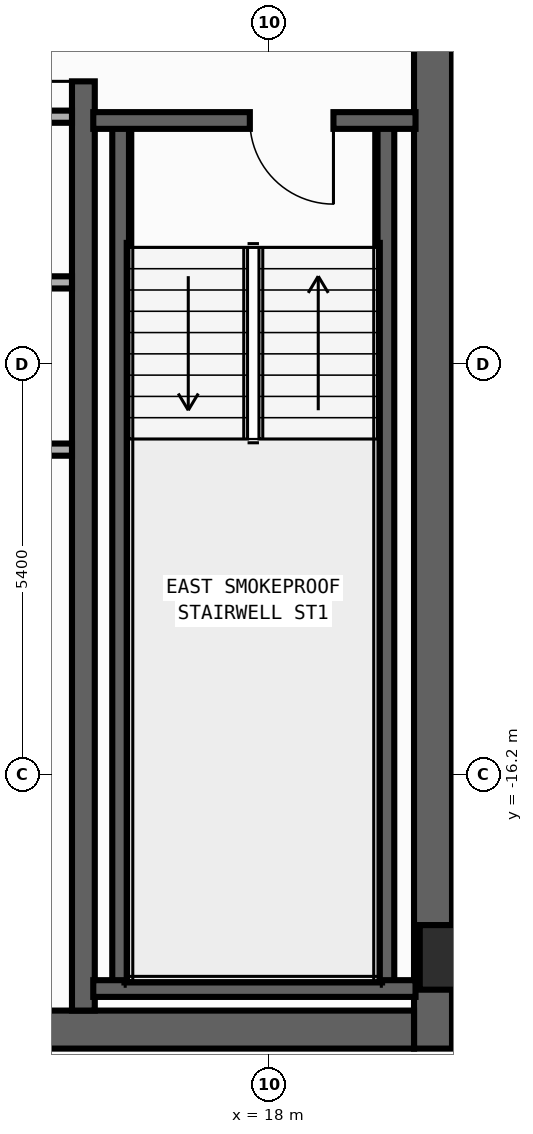
"""IFC4 building model, lengths in metres.
Left out: names, types, materials, properties, quantities, classifications, styles, units other than length and angle.
Written with IfcOpenShell. Run it as: python <this file> out.ifc"""

import sys

from ifc_helpers import new_model, si_unit, direction, frame, frame_2d, origin, origin_2d, place, context, subcontext, project, spatial, rectangle, extrude, element, fill, save


model = new_model("IFC4")
c1 = context("Model", 3, precision=1e-05, world=origin(), true_north=direction((0.0, 1.0)))
c2 = subcontext(c1, "Body", "Model", "MODEL_VIEW")
j1 = project(units=[si_unit("LENGTHUNIT", "METRE"), si_unit("PLANEANGLEUNIT", "RADIAN")], contexts=[c1])
p1 = place(None, origin())
s1 = spatial("IfcSite", under=j1, at=p1, CompositionType="ELEMENT")
p2 = place(p1, origin())
s2 = spatial("IfcBuilding", under=s1, at=p2, CompositionType="ELEMENT")
p3 = place(p2, frame((0.0, 0.0, 262.0)))
s3 = spatial("IfcBuildingStorey", under=s2, at=p3, CompositionType="ELEMENT", Elevation=262.0)
p4 = place(p3, frame((20.15, -19.8, 0.0), z_axis=(0.0, 0.0, 1.0), x_axis=(0.0, 1.0, 0.0)))
e1 = element("IfcWall", 1, at=p4, inside=s3, PredefinedType="SHEAR", context=c2, shape_type="SweptSolid", body=[
    extrude(rectangle(XDim=27.0, YDim=0.5, at=frame_2d((13.5, 0.0))), origin(), (0.0, 0.0, 1.0), 3.34),
])
p5 = place(p3, frame((12.5, -19.55, 0.0), z_axis=(0.0, 0.0, 1.0), x_axis=(1.0, 0.0, 0.0)))
e2 = element("IfcWall", 2, at=p5, inside=s3, PredefinedType="SHEAR", context=c2, shape_type="SweptSolid", body=[
    extrude(rectangle(XDim=7.4, YDim=0.5, at=frame_2d((3.7, 0.0))), origin(), (0.0, 0.0, 1.0), 3.34),
])
p6 = place(p3, frame((15.55, -19.3, 0.0), z_axis=(0.0, 0.0, 1.0), x_axis=(0.0, 1.0, 0.0)))
e3 = element("IfcWall", 3, at=p6, inside=s3, PredefinedType="SHEAR", context=c2, shape_type="SweptSolid", body=[
    extrude(rectangle(XDim=26.0, YDim=0.3, at=frame_2d((13.0, 0.0))), origin(), (0.0, 0.0, 1.0), 3.34),
])
p7 = place(p6, frame((12.225, 0.0, 0.0)))
e4 = element("IfcOpeningElement", 4, at=p7, cuts=e3, PredefinedType="OPENING", context=c2, shape_type="SweptSolid", body=[
    extrude(rectangle(XDim=1.15, YDim=2.2, at=frame_2d((0.575, 1.1))), frame((0.0, 0.16, 0.0), z_axis=(0.0, -1.0, 0.0), x_axis=(1.0, 0.0, 0.0)), (0.0, 0.0, 1.0), 0.32),
])
p8 = place(p6, frame((24.625, 0.0, 0.0)))
e5 = element("IfcOpeningElement", 5, at=p8, cuts=e3, PredefinedType="OPENING", context=c2, shape_type="SweptSolid", body=[
    extrude(rectangle(XDim=0.85, YDim=2.1, at=frame_2d((0.425, 1.05))), frame((0.0, 0.16, 0.0), z_axis=(0.0, -1.0, 0.0), x_axis=(1.0, 0.0, 0.0)), (0.0, 0.0, 1.0), 0.32),
])
for number, where, z_axis, x_axis in (
    (6, (16.04, -19.01, 0.0), (0.0, 0.0, 1.0), (0.0, 1.0, 0.0)),
    (7, (19.53, -19.01, 0.0), (0.0, 0.0, 1.0), (0.0, 1.0, 0.0)),
):
    element("IfcWall", number, at=place(p3, frame(where, z_axis=z_axis, x_axis=x_axis)), inside=s3, PredefinedType="SHEAR", context=c2, shape_type="SweptSolid", body=[
        extrude(rectangle(XDim=11.42, YDim=0.22, at=frame_2d((5.71, 0.0))), origin(), (0.0, 0.0, 1.0), 3.34),
    ])
p9 = place(p3, frame((15.68, -19.01, 0.0), z_axis=(0.0, 0.0, 1.0), x_axis=(1.0, 0.0, 0.0)))
e8 = element("IfcWall", 8, at=p9, inside=s3, PredefinedType="SHEAR", context=c2, shape_type="SweptSolid", body=[
    extrude(rectangle(XDim=4.24, YDim=0.22, at=frame_2d((2.12, 0.0))), origin(), (0.0, 0.0, 1.0), 3.34),
])
p10 = place(p3, frame((19.92, -7.59, 0.0), z_axis=(0.0, 0.0, 1.0), x_axis=(-1.0, 0.0, 0.0)))
e9 = element("IfcWall", 9, at=p10, inside=s3, PredefinedType="SHEAR", context=c2, shape_type="SweptSolid", body=[
    extrude(rectangle(XDim=4.24, YDim=0.22, at=frame_2d((2.12, 0.0))), origin(), (0.0, 0.0, 1.0), 3.34),
])
p11 = place(p10, frame((1.08, 0.0, 0.0)))
e10 = element("IfcOpeningElement", 10, at=p11, cuts=e9, PredefinedType="OPENING", context=c2, shape_type="SweptSolid", body=[
    extrude(rectangle(XDim=1.1, YDim=2.2, at=frame_2d((0.55, 1.1))), frame((0.0, 0.12, 0.0), z_axis=(0.0, -1.0, 0.0), x_axis=(1.0, 0.0, 0.0)), (0.0, 0.0, 1.0), 0.24),
])
p12 = place(p3, frame((20.4, -18.6, 0.0), z_axis=(0.0, 0.0, 1.0), x_axis=(1.0, 0.0, 0.0)))
e11 = element("IfcColumn", 11, at=p12, inside=s3, PredefinedType="COLUMN", context=c2, shape_type="SweptSolid", body=[
    extrude(rectangle(XDim=0.85, YDim=0.85, at=origin_2d()), origin(), (0.0, 0.0, 1.0), 3.6),
])
p13 = place(p3, frame((12.8, -7.54, 0.0), z_axis=(0.0, 0.0, 1.0), x_axis=(1.0, 0.0, 0.0)))
e12 = element("IfcWall", 12, at=p13, inside=s3, PredefinedType="STANDARD", context=c2, shape_type="SweptSolid", body=[
    extrude(rectangle(XDim=2.6, YDim=0.16, at=frame_2d((1.3, 0.0))), origin(), (0.0, 0.0, 1.0), 3.34),
])
for number, where, z_axis, x_axis in (
    (13, (12.5, -11.92, 0.0), (0.0, 0.0, 1.0), (1.0, 0.0, 0.0)),
    (14, (12.5, -9.72, 0.0), (0.0, 0.0, 1.0), (1.0, 0.0, 0.0)),
):
    element("IfcWall", number, at=place(p3, frame(where, z_axis=z_axis, x_axis=x_axis)), inside=s3, PredefinedType="PARTITIONING", context=c2, shape_type="SweptSolid", body=[
        extrude(rectangle(XDim=2.9, YDim=0.16, at=frame_2d((1.45, 0.0))), origin(), (0.0, 0.0, 1.0), 3.34),
    ])
p14 = place(p11, origin())
e15 = element("IfcDoor", 15, at=p14, inside=s3, OperationType="SINGLE_SWING_LEFT", PredefinedType="DOOR", context=c2, shape_type="SweptSolid", body=[
    extrude(rectangle(XDim=1.1, YDim=2.2, at=frame_2d((0.55, 1.1))), frame((0.0, 0.025, 0.0), z_axis=(0.0, -1.0, 0.0), x_axis=(1.0, 0.0, 0.0)), (0.0, 0.0, 1.0), 0.05),
])
fill(e10, e15)
p15 = place(p7, origin())
e16 = element("IfcDoor", 16, at=p15, inside=s3, OperationType="SINGLE_SWING_LEFT", PredefinedType="DOOR", context=c2, shape_type="SweptSolid", body=[
    extrude(rectangle(XDim=1.15, YDim=2.2, at=frame_2d((0.575, 1.1))), frame((0.0, 0.025, 0.0), z_axis=(0.0, -1.0, 0.0), x_axis=(1.0, 0.0, 0.0)), (0.0, 0.0, 1.0), 0.05),
])
fill(e4, e16)
save(model, sys.argv[1])
